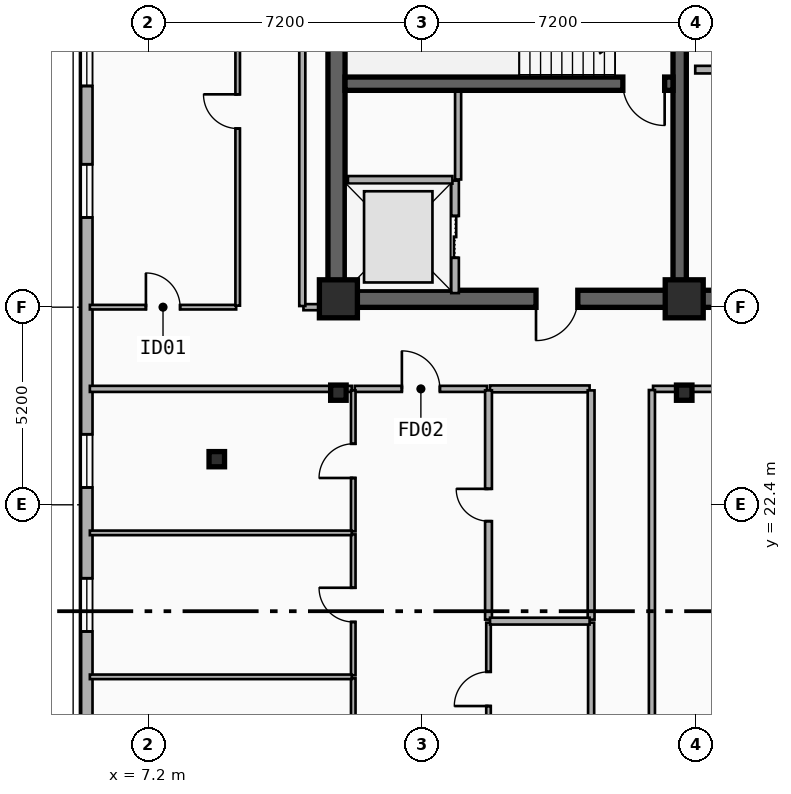
"""IFC4 building model, lengths in metres.
Left out: names, types, materials, properties, quantities, classifications, styles, units other than length and angle.
Written with IfcOpenShell. Run it as: python <this file> out.ifc"""

import sys

from ifc_helpers import new_model, si_unit, direction, frame, frame_2d, origin, origin_2d, place, context, subcontext, project, spatial, rectangle, i_section, extrude, element, fill, save


model = new_model("IFC4")
c1 = context("Model", 3, precision=1e-05, world=origin(), true_north=direction((0.0, 1.0)))
c2 = subcontext(c1, "Body", "Model", "MODEL_VIEW")
j1 = project(units=[si_unit("LENGTHUNIT", "METRE"), si_unit("PLANEANGLEUNIT", "RADIAN")], contexts=[c1])
p1 = place(None, origin())
s1 = spatial("IfcSite", under=j1, at=p1, CompositionType="ELEMENT")
p2 = place(p1, origin())
s2 = spatial("IfcBuilding", under=s1, at=p2, CompositionType="ELEMENT")
p3 = place(p2, frame((0.0, 0.0, 229.2)))
s3 = spatial("IfcBuildingStorey", under=s2, at=p3, CompositionType="ELEMENT", Elevation=229.2)
p4 = place(p3, frame((21.18, 27.82, 0.0), z_axis=(0.0, 0.0, 1.0), x_axis=(-1.0, 0.0, 0.0)))
e1 = element("IfcWall", 1, at=p4, inside=s3, PredefinedType="SHEAR", context=c2, shape_type="SweptSolid", body=[
    extrude(rectangle(XDim=9.03, YDim=0.45, at=frame_2d((4.515, 0.0))), origin(), (0.0, 0.0, 1.0), 3.6),
])
p5 = place(p4, frame((2.68, 0.0, 0.0)))
e2 = element("IfcOpeningElement", 2, at=p5, cuts=e1, PredefinedType="OPENING", context=c2, shape_type="SweptSolid", body=[
    extrude(rectangle(XDim=1.1, YDim=2.15, at=frame_2d((0.55, 1.075))), frame((0.0, 0.235, 0.0), z_axis=(0.0, -1.0, 0.0), x_axis=(1.0, 0.0, 0.0)), (0.0, 0.0, 1.0), 0.47),
])
p6 = place(p3, frame((33.15, 27.82, 0.0), z_axis=(0.0, 0.0, 1.0), x_axis=(-1.0, 0.0, 0.0)))
e3 = element("IfcWall", 3, at=p6, inside=s3, PredefinedType="SHEAR", context=c2, shape_type="SweptSolid", body=[
    extrude(rectangle(XDim=11.97, YDim=0.45, at=frame_2d((5.985, 0.0))), origin(), (0.0, 0.0, 1.0), 3.6),
])
p7 = place(p6, frame((6.1, 0.0, 0.0)))
e4 = element("IfcOpeningElement", 4, at=p7, cuts=e3, PredefinedType="OPENING", context=c2, shape_type="SweptSolid", body=[
    extrude(rectangle(XDim=1.6, YDim=2.2, at=frame_2d((0.8, 1.1))), frame((0.0, 0.235, 0.0), z_axis=(0.0, -1.0, 0.0), x_axis=(1.0, 0.0, 0.0)), (0.0, 0.0, 1.0), 0.47),
])
p8 = place(p3, frame((12.15, 28.045, 0.0), z_axis=(0.0, 0.0, 1.0), x_axis=(0.0, 1.0, 0.0)))
e5 = element("IfcWall", 5, at=p8, inside=s3, PredefinedType="SHEAR", context=c2, shape_type="SweptSolid", body=[
    extrude(rectangle(XDim=8.78, YDim=0.45, at=frame_2d((4.39, 0.0))), origin(), (0.0, 0.0, 1.0), 3.6),
])
p9 = place(p3, frame((21.18, 28.045, 0.0), z_axis=(0.0, 0.0, 1.0), x_axis=(0.0, 1.0, 0.0)))
e6 = element("IfcWall", 6, at=p9, inside=s3, PredefinedType="SHEAR", context=c2, shape_type="SweptSolid", body=[
    extrude(rectangle(XDim=8.78, YDim=0.35, at=frame_2d((4.39, 0.0))), origin(), (0.0, 0.0, 1.0), 3.6),
])
p10 = place(p3, frame((21.005, 33.48, 0.0), z_axis=(0.0, 0.0, 1.0), x_axis=(-1.0, 0.0, 0.0)))
e7 = element("IfcWall", 7, at=p10, inside=s3, PredefinedType="SHEAR", context=c2, shape_type="SweptSolid", body=[
    extrude(rectangle(XDim=8.63, YDim=0.35, at=frame_2d((4.315, 0.0))), origin(), (0.0, 0.0, 1.0), 3.6),
])
p11 = place(p10, frame((0.22, 0.0, 0.0)))
e8 = element("IfcOpeningElement", 8, at=p11, cuts=e7, PredefinedType="OPENING", context=c2, shape_type="SweptSolid", body=[
    extrude(rectangle(XDim=1.1, YDim=2.15, at=frame_2d((0.55, 1.075))), frame((0.0, 0.185, 0.0), z_axis=(0.0, -1.0, 0.0), x_axis=(1.0, 0.0, 0.0)), (0.0, 0.0, 1.0), 0.37),
])
for number, where, z_axis, x_axis in (
    (9, (12.2, 27.82, 0.0), (0.0, 0.0, 1.0), (1.0, 0.0, 0.0)),
    (10, (21.3, 27.82, 0.0), (0.0, 0.0, 1.0), (1.0, 0.0, 0.0)),
):
    element("IfcColumn", number, at=place(p3, frame(where, z_axis=z_axis, x_axis=x_axis)), inside=s3, PredefinedType="COLUMN", context=c2, shape_type="SweptSolid", body=[
        extrude(rectangle(XDim=1.0, YDim=1.0, at=origin_2d()), origin(), (0.0, 0.0, 1.0), 3.6),
    ])
for number, where, z_axis, x_axis in (
    (11, (12.2, 25.35, 0.0), (0.0, 0.0, 1.0), (1.0, 0.0, 0.0)),
    (12, (21.3, 25.35, 0.0), (0.0, 0.0, 1.0), (1.0, 0.0, 0.0)),
    (13, (9.0, 23.6, 0.0), (0.0, 0.0, 1.0), (1.0, 0.0, 0.0)),
):
    element("IfcColumn", number, at=place(p3, frame(where, z_axis=z_axis, x_axis=x_axis)), inside=s3, PredefinedType="COLUMN", context=c2, shape_type="SweptSolid", body=[
        extrude(i_section(OverallWidth=0.408, OverallDepth=0.4, WebThickness=0.025, FlangeThickness=0.039, FilletRadius=0.015, at=origin_2d()), origin(), (0.0, 0.0, 1.0), 3.6),
    ])
p12 = place(p3, frame((5.58, 8.6, 0.0), z_axis=(0.0, 0.0, 1.0), x_axis=(0.0, 1.0, 0.0)))
e14 = element("IfcWall", 14, at=p12, inside=s3, PredefinedType="SOLIDWALL", context=c2, shape_type="SweptSolid", body=[
    extrude(rectangle(XDim=28.6, YDim=0.3, at=frame_2d((14.3, 0.0))), origin(), (0.0, 0.0, 1.0), 3.34),
])
p13 = place(p12, frame((21.36, 0.0, 0.34)))
e15 = element("IfcOpeningElement", 15, at=p13, cuts=e14, PredefinedType="OPENING", context=c2, shape_type="SweptSolid", body=[
    extrude(rectangle(XDim=1.4, YDim=2.1, at=frame_2d((0.7, 1.05))), frame((0.0, 0.16, 0.0), z_axis=(0.0, -1.0, 0.0), x_axis=(1.0, 0.0, 0.0)), (0.0, 0.0, 1.0), 0.32),
])
p14 = place(p12, frame((24.82, 0.0, 0.34)))
e16 = element("IfcOpeningElement", 16, at=p14, cuts=e14, PredefinedType="OPENING", context=c2, shape_type="SweptSolid", body=[
    extrude(rectangle(XDim=1.4, YDim=2.1, at=frame_2d((0.7, 1.05))), frame((0.0, 0.16, 0.0), z_axis=(0.0, -1.0, 0.0), x_axis=(1.0, 0.0, 0.0)), (0.0, 0.0, 1.0), 0.32),
])
p15 = place(p12, frame((2.671, 0.0, 0.34)))
e17 = element("IfcOpeningElement", 17, at=p15, cuts=e14, PredefinedType="OPENING", context=c2, shape_type="SweptSolid", body=[
    extrude(rectangle(XDim=1.4, YDim=2.1, at=frame_2d((0.7, 1.05))), frame((0.0, 0.16, 0.0), z_axis=(0.0, -1.0, 0.0), x_axis=(1.0, 0.0, 0.0)), (0.0, 0.0, 1.0), 0.32),
])
p16 = place(p12, frame((6.679, 0.0, 0.34)))
e18 = element("IfcOpeningElement", 18, at=p16, cuts=e14, PredefinedType="OPENING", context=c2, shape_type="SweptSolid", body=[
    extrude(rectangle(XDim=1.4, YDim=2.1, at=frame_2d((0.7, 1.05))), frame((0.0, 0.16, 0.0), z_axis=(0.0, -1.0, 0.0), x_axis=(1.0, 0.0, 0.0)), (0.0, 0.0, 1.0), 0.32),
])
p17 = place(p12, frame((10.467, 0.0, 0.34)))
e19 = element("IfcOpeningElement", 19, at=p17, cuts=e14, PredefinedType="OPENING", context=c2, shape_type="SweptSolid", body=[
    extrude(rectangle(XDim=1.4, YDim=2.1, at=frame_2d((0.7, 1.05))), frame((0.0, 0.16, 0.0), z_axis=(0.0, -1.0, 0.0), x_axis=(1.0, 0.0, 0.0)), (0.0, 0.0, 1.0), 0.32),
])
p18 = place(p12, frame((14.256, 0.0, 0.34)))
e20 = element("IfcOpeningElement", 20, at=p18, cuts=e14, PredefinedType="OPENING", context=c2, shape_type="SweptSolid", body=[
    extrude(rectangle(XDim=1.4, YDim=2.1, at=frame_2d((0.7, 1.05))), frame((0.0, 0.16, 0.0), z_axis=(0.0, -1.0, 0.0), x_axis=(1.0, 0.0, 0.0)), (0.0, 0.0, 1.0), 0.32),
])
p19 = place(p3, frame((15.27, 27.97, 0.0), z_axis=(0.0, 0.0, 1.0), x_axis=(0.0, 1.0, 0.0)))
e21 = element("IfcWall", 21, at=p19, inside=s3, PredefinedType="PARTITIONING", context=c2, shape_type="SweptSolid", body=[
    extrude(rectangle(XDim=2.96, YDim=0.2, at=frame_2d((1.48, 0.0))), origin(), (0.0, 0.0, 1.0), 2.41),
])
p20 = place(p19, frame((0.93, 0.0, 0.0)))
e22 = element("IfcOpeningElement", 22, at=p20, cuts=e21, PredefinedType="OPENING", context=c2, shape_type="SweptSolid", body=[
    extrude(rectangle(XDim=1.1, YDim=2.15, at=frame_2d((0.55, 1.075))), frame((0.0, 0.11, 0.0), z_axis=(0.0, -1.0, 0.0), x_axis=(1.0, 0.0, 0.0)), (0.0, 0.0, 1.0), 0.22),
])
p21 = place(p3, frame((12.45, 30.95, 0.0), z_axis=(0.0, 0.0, 1.0), x_axis=(1.0, 0.0, 0.0)))
e23 = element("IfcWall", 23, at=p21, inside=s3, PredefinedType="PARTITIONING", context=c2, shape_type="SweptSolid", body=[
    extrude(rectangle(XDim=2.75, YDim=0.2, at=frame_2d((1.375, 0.0))), origin(), (0.0, 0.0, 1.0), 2.41),
])
p22 = place(p3, frame((21.59, 33.85, 0.0), z_axis=(0.0, 0.0, 1.0), x_axis=(1.0, 0.0, 0.0)))
e24 = element("IfcWall", 24, at=p22, inside=s3, PredefinedType="PARTITIONING", context=c2, shape_type="SweptSolid", body=[
    extrude(rectangle(XDim=1.97, YDim=0.2, at=frame_2d((0.985, 0.0))), origin(), (0.0, 0.0, 1.0), 2.41),
])
p23 = place(p3, frame((5.66, 27.6, 0.0), z_axis=(0.0, 0.0, 1.0), x_axis=(1.0, 0.0, 0.0)))
e25 = element("IfcWall", 25, at=p23, inside=s3, PredefinedType="PARTITIONING", context=c2, shape_type="SweptSolid", body=[
    extrude(rectangle(XDim=3.85, YDim=0.12, at=frame_2d((1.925, 0.0))), origin(), (0.0, 0.0, 1.0), 2.67),
])
p24 = place(p23, frame((1.475, 0.0, 0.0)))
e26 = element("IfcOpeningElement", 26, at=p24, cuts=e25, PredefinedType="OPENING", context=c2, shape_type="SweptSolid", body=[
    extrude(rectangle(XDim=0.9, YDim=2.1, at=frame_2d((0.45, 1.05))), frame((0.0, 0.07, 0.0), z_axis=(0.0, -1.0, 0.0), x_axis=(1.0, 0.0, 0.0)), (0.0, 0.0, 1.0), 0.14),
])
p25 = place(p3, frame((12.631, 25.45, 0.0), z_axis=(0.0, 0.0, 1.0), x_axis=(1.0, 0.0, 0.0)))
e27 = element("IfcWall", 27, at=p25, inside=s3, PredefinedType="PARTITIONING", context=c2, shape_type="SweptSolid", body=[
    extrude(rectangle(XDim=3.479, YDim=0.16, at=frame_2d((1.74, 0.0))), origin(), (0.0, 0.0, 1.0), 2.52),
])
p26 = place(p25, frame((1.24, 0.0, 0.0)))
e28 = element("IfcOpeningElement", 28, at=p26, cuts=e27, PredefinedType="OPENING", context=c2, shape_type="SweptSolid", body=[
    extrude(rectangle(XDim=1.0, YDim=2.15, at=frame_2d((0.5, 1.075))), frame((0.0, 0.09, 0.0), z_axis=(0.0, -1.0, 0.0), x_axis=(1.0, 0.0, 0.0)), (0.0, 0.0, 1.0), 0.18),
])
p27 = place(p3, frame((16.19, 25.45, 0.0), z_axis=(0.0, 0.0, 1.0), x_axis=(1.0, 0.0, 0.0)))
e29 = element("IfcWall", 29, at=p27, inside=s3, PredefinedType="PLUMBINGWALL", context=c2, shape_type="SweptSolid", body=[
    extrude(rectangle(XDim=2.62, YDim=0.18, at=frame_2d((1.31, 0.0))), origin(), (0.0, 0.0, 1.0), 3.34),
])
p28 = place(p3, frame((5.66, 25.45, 0.0), z_axis=(0.0, 0.0, 1.0), x_axis=(1.0, 0.0, 0.0)))
e30 = element("IfcWall", 30, at=p28, inside=s3, PredefinedType="PARTITIONING", context=c2, shape_type="SweptSolid", body=[
    extrude(rectangle(XDim=6.891, YDim=0.16, at=frame_2d((3.446, 0.0))), origin(), (0.0, 0.0, 1.0), 2.52),
])
p29 = place(p3, frame((18.85, 15.811, 0.0), z_axis=(0.0, 0.0, 1.0), x_axis=(0.0, 1.0, 0.0)))
e31 = element("IfcWall", 31, at=p29, inside=s3, PredefinedType="PARTITIONING", context=c2, shape_type="SweptSolid", body=[
    extrude(rectangle(XDim=3.488, YDim=0.16, at=frame_2d((1.744, 0.0))), origin(), (0.0, 0.0, 1.0), 2.92),
])
p30 = place(p3, frame((18.85, 19.379, 0.0), z_axis=(0.0, 0.0, 1.0), x_axis=(0.0, 1.0, 0.0)))
e32 = element("IfcWall", 32, at=p30, inside=s3, PredefinedType="PLUMBINGWALL", context=c2, shape_type="SweptSolid", body=[
    extrude(rectangle(XDim=6.031, YDim=0.18, at=frame_2d((3.016, 0.0))), origin(), (0.0, 0.0, 1.0), 2.92),
])
p31 = place(p3, frame((9.55, 27.64, 0.0), z_axis=(0.0, 0.0, 1.0), x_axis=(0.0, 1.0, 0.0)))
e33 = element("IfcWall", 33, at=p31, inside=s3, PredefinedType="PARTITIONING", context=c2, shape_type="SweptSolid", body=[
    extrude(rectangle(XDim=10.22, YDim=0.12, at=frame_2d((5.11, 0.0))), origin(), (0.0, 0.0, 1.0), 2.82),
])
p32 = place(p31, frame((4.66, 0.0, 0.0)))
e34 = element("IfcOpeningElement", 34, at=p32, cuts=e33, PredefinedType="OPENING", context=c2, shape_type="SweptSolid", body=[
    extrude(rectangle(XDim=0.9, YDim=2.1, at=frame_2d((0.45, 1.05))), frame((0.0, 0.07, 0.0), z_axis=(0.0, -1.0, 0.0), x_axis=(1.0, 0.0, 0.0)), (0.0, 0.0, 1.0), 0.14),
])
p33 = place(p3, frame((16.15, 15.811, 0.0), z_axis=(0.0, 0.0, 1.0), x_axis=(0.0, 1.0, 0.0)))
e35 = element("IfcWall", 35, at=p33, inside=s3, PredefinedType="PARTITIONING", context=c2, shape_type="SweptSolid", body=[
    extrude(rectangle(XDim=3.488, YDim=0.12, at=frame_2d((1.744, 0.0))), origin(), (0.0, 0.0, 1.0), 2.92),
])
p34 = place(p33, frame((1.294, 0.0, 0.0)))
e36 = element("IfcOpeningElement", 36, at=p34, cuts=e35, PredefinedType="OPENING", context=c2, shape_type="SweptSolid", body=[
    extrude(rectangle(XDim=0.9, YDim=2.1, at=frame_2d((0.45, 1.05))), frame((0.0, 0.07, 0.0), z_axis=(0.0, -1.0, 0.0), x_axis=(1.0, 0.0, 0.0)), (0.0, 0.0, 1.0), 0.14),
])
p35 = place(p3, frame((16.15, 19.379, 0.0), z_axis=(0.0, 0.0, 1.0), x_axis=(0.0, 1.0, 0.0)))
e37 = element("IfcWall", 37, at=p35, inside=s3, PredefinedType="PLUMBINGWALL", context=c2, shape_type="SweptSolid", body=[
    extrude(rectangle(XDim=6.031, YDim=0.18, at=frame_2d((3.016, 0.0))), origin(), (0.0, 0.0, 1.0), 2.92),
])
p36 = place(p35, frame((2.591, 0.0, 0.0)))
e38 = element("IfcOpeningElement", 38, at=p36, cuts=e37, PredefinedType="OPENING", context=c2, shape_type="SweptSolid", body=[
    extrude(rectangle(XDim=0.85, YDim=2.1, at=frame_2d((0.425, 1.05))), frame((0.0, 0.1, 0.0), z_axis=(0.0, -1.0, 0.0), x_axis=(1.0, 0.0, 0.0)), (0.0, 0.0, 1.0), 0.2),
])
p37 = place(p3, frame((12.591, 14.125, 0.0), z_axis=(0.0, 0.0, 1.0), x_axis=(0.0, 1.0, 0.0)))
e39 = element("IfcWall", 39, at=p37, inside=s3, PredefinedType="PARTITIONING", context=c2, shape_type="SweptSolid", body=[
    extrude(rectangle(XDim=3.708, YDim=0.12, at=frame_2d((1.854, 0.0))), origin(), (0.0, 0.0, 1.0), 2.52),
])
p38 = place(p37, frame((1.404, 0.0, 0.0)))
e40 = element("IfcOpeningElement", 40, at=p38, cuts=e39, PredefinedType="OPENING", context=c2, shape_type="SweptSolid", body=[
    extrude(rectangle(XDim=0.9, YDim=2.1, at=frame_2d((0.45, 1.05))), frame((0.0, 0.07, 0.0), z_axis=(0.0, -1.0, 0.0), x_axis=(1.0, 0.0, 0.0)), (0.0, 0.0, 1.0), 0.14),
])
p39 = place(p3, frame((12.591, 17.913, 0.0), z_axis=(0.0, 0.0, 1.0), x_axis=(0.0, 1.0, 0.0)))
e41 = element("IfcWall", 41, at=p39, inside=s3, PredefinedType="PARTITIONING", context=c2, shape_type="SweptSolid", body=[
    extrude(rectangle(XDim=3.708, YDim=0.12, at=frame_2d((1.854, 0.0))), origin(), (0.0, 0.0, 1.0), 2.52),
])
p40 = place(p39, frame((1.404, 0.0, 0.0)))
e42 = element("IfcOpeningElement", 42, at=p40, cuts=e41, PredefinedType="OPENING", context=c2, shape_type="SweptSolid", body=[
    extrude(rectangle(XDim=0.9, YDim=2.1, at=frame_2d((0.45, 1.05))), frame((0.0, 0.07, 0.0), z_axis=(0.0, -1.0, 0.0), x_axis=(1.0, 0.0, 0.0)), (0.0, 0.0, 1.0), 0.14),
])
p41 = place(p3, frame((12.591, 21.701, 0.0), z_axis=(0.0, 0.0, 1.0), x_axis=(0.0, 1.0, 0.0)))
e43 = element("IfcWall", 43, at=p41, inside=s3, PredefinedType="PARTITIONING", context=c2, shape_type="SweptSolid", body=[
    extrude(rectangle(XDim=3.709, YDim=0.12, at=frame_2d((1.854, 0.0))), origin(), (0.0, 0.0, 1.0), 2.52),
])
p42 = place(p41, frame((1.405, 0.0, 0.0)))
e44 = element("IfcOpeningElement", 44, at=p42, cuts=e43, PredefinedType="OPENING", context=c2, shape_type="SweptSolid", body=[
    extrude(rectangle(XDim=0.9, YDim=2.1, at=frame_2d((0.45, 1.05))), frame((0.0, 0.07, 0.0), z_axis=(0.0, -1.0, 0.0), x_axis=(1.0, 0.0, 0.0)), (0.0, 0.0, 1.0), 0.14),
])
p43 = place(p3, frame((16.19, 19.339, 0.0), z_axis=(0.0, 0.0, 1.0), x_axis=(1.0, 0.0, 0.0)))
e45 = element("IfcWall", 45, at=p43, inside=s3, PredefinedType="PLUMBINGWALL", context=c2, shape_type="SweptSolid", body=[
    extrude(rectangle(XDim=2.62, YDim=0.18, at=frame_2d((1.31, 0.0))), origin(), (0.0, 0.0, 1.0), 2.93),
])
for number, where, z_axis, x_axis in (
    (46, (5.66, 17.873, 0.0), (0.0, 0.0, 1.0), (1.0, 0.0, 0.0)),
    (47, (5.66, 21.661, 0.0), (0.0, 0.0, 1.0), (1.0, 0.0, 0.0)),
):
    element("IfcWall", number, at=place(p3, frame(where, z_axis=z_axis, x_axis=x_axis)), inside=s3, PredefinedType="PARTITIONING", context=c2, shape_type="SweptSolid", body=[
        extrude(rectangle(XDim=6.891, YDim=0.12, at=frame_2d((3.446, 0.0))), origin(), (0.0, 0.0, 1.0), 2.52),
    ])
p44 = place(p3, frame((15.35, 30.96, 0.0), z_axis=(0.0, 0.0, 1.0), x_axis=(0.0, 1.0, 0.0)))
e48 = element("IfcWall", 48, at=p44, inside=s3, PredefinedType="PARTITIONING", context=c2, shape_type="SweptSolid", body=[
    extrude(rectangle(XDim=2.31, YDim=0.16, at=frame_2d((1.155, 0.0))), origin(), (0.0, 0.0, 1.0), 3.34),
])
p45 = place(p3, frame((20.48, 25.45, 0.0), z_axis=(0.0, 0.0, 1.0), x_axis=(1.0, 0.0, 0.0)))
e49 = element("IfcWall", 49, at=p45, inside=s3, PredefinedType="PARTITIONING", context=c2, shape_type="SweptSolid", body=[
    extrude(rectangle(XDim=15.84, YDim=0.16, at=frame_2d((7.92, 0.0))), origin(), (0.0, 0.0, 1.0), 2.52),
])
p46 = place(p3, frame((11.28, 27.6, 0.0), z_axis=(0.0, 0.0, 1.0), x_axis=(1.0, 0.0, 0.0)))
e50 = element("IfcWall", 50, at=p46, inside=s3, PredefinedType="PARTITIONING", context=c2, shape_type="SweptSolid", body=[
    extrude(rectangle(XDim=0.84, YDim=0.16, at=frame_2d((0.42, 0.0))), origin(), (0.0, 0.0, 1.0), 2.41),
])
p47 = place(p3, frame((20.45, 13.63, 0.0), z_axis=(0.0, 0.0, 1.0), x_axis=(0.0, 1.0, 0.0)))
e51 = element("IfcWall", 51, at=p47, inside=s3, PredefinedType="PARTITIONING", context=c2, shape_type="SweptSolid", body=[
    extrude(rectangle(XDim=11.79, YDim=0.16, at=frame_2d((5.895, 0.0))), origin(), (0.0, 0.0, 1.0), 2.92),
])
p48 = place(p3, frame((11.25, 27.63, 0.0), z_axis=(0.0, 0.0, 1.0), x_axis=(0.0, 1.0, 0.0)))
e52 = element("IfcWall", 52, at=p48, inside=s3, PredefinedType="PARTITIONING", context=c2, shape_type="SweptSolid", body=[
    extrude(rectangle(XDim=10.24, YDim=0.16, at=frame_2d((5.12, 0.0))), origin(), (0.0, 0.0, 1.0), 2.82),
])
p49 = place(p13, origin())
e53 = element("IfcWindow", 53, at=p49, inside=s3, PartitioningType="SINGLE_PANEL", PredefinedType="WINDOW", context=c2, shape_type="SweptSolid", body=[
    extrude(rectangle(XDim=1.4, YDim=2.1, at=frame_2d((0.7, 1.05))), frame((0.0, 0.03, 0.0), z_axis=(0.0, -1.0, 0.0), x_axis=(1.0, 0.0, 0.0)), (0.0, 0.0, 1.0), 0.06),
])
fill(e15, e53)
p50 = place(p14, origin())
e54 = element("IfcWindow", 54, at=p50, inside=s3, PartitioningType="SINGLE_PANEL", PredefinedType="WINDOW", context=c2, shape_type="SweptSolid", body=[
    extrude(rectangle(XDim=1.4, YDim=2.1, at=frame_2d((0.7, 1.05))), frame((0.0, 0.03, 0.0), z_axis=(0.0, -1.0, 0.0), x_axis=(1.0, 0.0, 0.0)), (0.0, 0.0, 1.0), 0.06),
])
fill(e16, e54)
p51 = place(p17, origin())
e55 = element("IfcWindow", 55, at=p51, inside=s3, PartitioningType="SINGLE_PANEL", PredefinedType="WINDOW", context=c2, shape_type="SweptSolid", body=[
    extrude(rectangle(XDim=1.4, YDim=2.1, at=frame_2d((0.7, 1.05))), frame((0.0, 0.03, 0.0), z_axis=(0.0, -1.0, 0.0), x_axis=(1.0, 0.0, 0.0)), (0.0, 0.0, 1.0), 0.06),
])
fill(e19, e55)
p52 = place(p18, origin())
e56 = element("IfcWindow", 56, at=p52, inside=s3, PartitioningType="SINGLE_PANEL", PredefinedType="WINDOW", context=c2, shape_type="SweptSolid", body=[
    extrude(rectangle(XDim=1.4, YDim=2.1, at=frame_2d((0.7, 1.05))), frame((0.0, 0.03, 0.0), z_axis=(0.0, -1.0, 0.0), x_axis=(1.0, 0.0, 0.0)), (0.0, 0.0, 1.0), 0.06),
])
fill(e20, e56)
p53 = place(p20, origin())
e57 = element("IfcDoor", 57, at=p53, inside=s3, OperationType="DOUBLE_DOOR_SLIDING", PredefinedType="DOOR", context=c2, shape_type="SweptSolid", body=[
    extrude(rectangle(XDim=1.1, YDim=2.15, at=frame_2d((0.55, 1.075))), frame((0.0, 0.025, 0.0), z_axis=(0.0, -1.0, 0.0), x_axis=(1.0, 0.0, 0.0)), (0.0, 0.0, 1.0), 0.05),
])
fill(e22, e57)
p54 = place(p11, origin())
e58 = element("IfcDoor", 58, at=p54, inside=s3, OperationType="SINGLE_SWING_LEFT", PredefinedType="DOOR", context=c2, shape_type="SweptSolid", body=[
    extrude(rectangle(XDim=1.1, YDim=2.15, at=frame_2d((0.55, 1.075))), frame((0.0, 0.025, 0.0), z_axis=(0.0, -1.0, 0.0), x_axis=(1.0, 0.0, 0.0)), (0.0, 0.0, 1.0), 0.05),
])
fill(e8, e58)
p55 = place(p5, origin())
e59 = element("IfcDoor", 59, at=p55, inside=s3, OperationType="SINGLE_SWING_RIGHT", PredefinedType="DOOR", context=c2, shape_type="SweptSolid", body=[
    extrude(rectangle(XDim=1.1, YDim=2.15, at=frame_2d((0.55, 1.075))), frame((0.0, 0.025, 0.0), z_axis=(0.0, -1.0, 0.0), x_axis=(1.0, 0.0, 0.0)), (0.0, 0.0, 1.0), 0.05),
])
fill(e2, e59)
p56 = place(p24, origin())
e60 = element("IfcDoor", 60, at=p56, inside=s3, OperationType="SINGLE_SWING_LEFT", PredefinedType="DOOR", context=c2, shape_type="SweptSolid", body=[
    extrude(rectangle(XDim=0.9, YDim=2.1, at=frame_2d((0.45, 1.05))), frame((0.0, 0.025, 0.0), z_axis=(0.0, -1.0, 0.0), x_axis=(1.0, 0.0, 0.0)), (0.0, 0.0, 1.0), 0.05),
])
fill(e26, e60)
p57 = place(p26, origin())
e61 = element("IfcDoor", 61, at=p57, inside=s3, OperationType="SINGLE_SWING_LEFT", PredefinedType="DOOR", context=c2, shape_type="SweptSolid", body=[
    extrude(rectangle(XDim=1.0, YDim=2.15, at=frame_2d((0.5, 1.075))), frame((0.0, 0.025, 0.0), z_axis=(0.0, -1.0, 0.0), x_axis=(1.0, 0.0, 0.0)), (0.0, 0.0, 1.0), 0.05),
])
fill(e28, e61)
p58 = place(p32, origin())
e62 = element("IfcDoor", 62, at=p58, inside=s3, OperationType="SINGLE_SWING_RIGHT", PredefinedType="DOOR", context=c2, shape_type="SweptSolid", body=[
    extrude(rectangle(XDim=0.9, YDim=2.1, at=frame_2d((0.45, 1.05))), frame((0.0, 0.025, 0.0), z_axis=(0.0, -1.0, 0.0), x_axis=(1.0, 0.0, 0.0)), (0.0, 0.0, 1.0), 0.05),
])
fill(e34, e62)
p59 = place(p34, origin())
e63 = element("IfcDoor", 63, at=p59, inside=s3, OperationType="SINGLE_SWING_LEFT", PredefinedType="DOOR", context=c2, shape_type="SweptSolid", body=[
    extrude(rectangle(XDim=0.9, YDim=2.1, at=frame_2d((0.45, 1.05))), frame((0.0, 0.025, 0.0), z_axis=(0.0, -1.0, 0.0), x_axis=(1.0, 0.0, 0.0)), (0.0, 0.0, 1.0), 0.05),
])
fill(e36, e63)
p60 = place(p36, origin())
e64 = element("IfcDoor", 64, at=p60, inside=s3, OperationType="SINGLE_SWING_RIGHT", PredefinedType="DOOR", context=c2, shape_type="SweptSolid", body=[
    extrude(rectangle(XDim=0.85, YDim=2.1, at=frame_2d((0.425, 1.05))), frame((0.0, 0.025, 0.0), z_axis=(0.0, -1.0, 0.0), x_axis=(1.0, 0.0, 0.0)), (0.0, 0.0, 1.0), 0.05),
])
fill(e38, e64)
p61 = place(p40, origin())
e65 = element("IfcDoor", 65, at=p61, inside=s3, OperationType="SINGLE_SWING_RIGHT", PredefinedType="DOOR", context=c2, shape_type="SweptSolid", body=[
    extrude(rectangle(XDim=0.9, YDim=2.1, at=frame_2d((0.45, 1.05))), frame((0.0, 0.025, 0.0), z_axis=(0.0, -1.0, 0.0), x_axis=(1.0, 0.0, 0.0)), (0.0, 0.0, 1.0), 0.05),
])
fill(e42, e65)
p62 = place(p42, origin())
e66 = element("IfcDoor", 66, at=p62, inside=s3, OperationType="SINGLE_SWING_LEFT", PredefinedType="DOOR", context=c2, shape_type="SweptSolid", body=[
    extrude(rectangle(XDim=0.9, YDim=2.1, at=frame_2d((0.45, 1.05))), frame((0.0, 0.025, 0.0), z_axis=(0.0, -1.0, 0.0), x_axis=(1.0, 0.0, 0.0)), (0.0, 0.0, 1.0), 0.05),
])
fill(e44, e66)
save(model, sys.argv[1])
